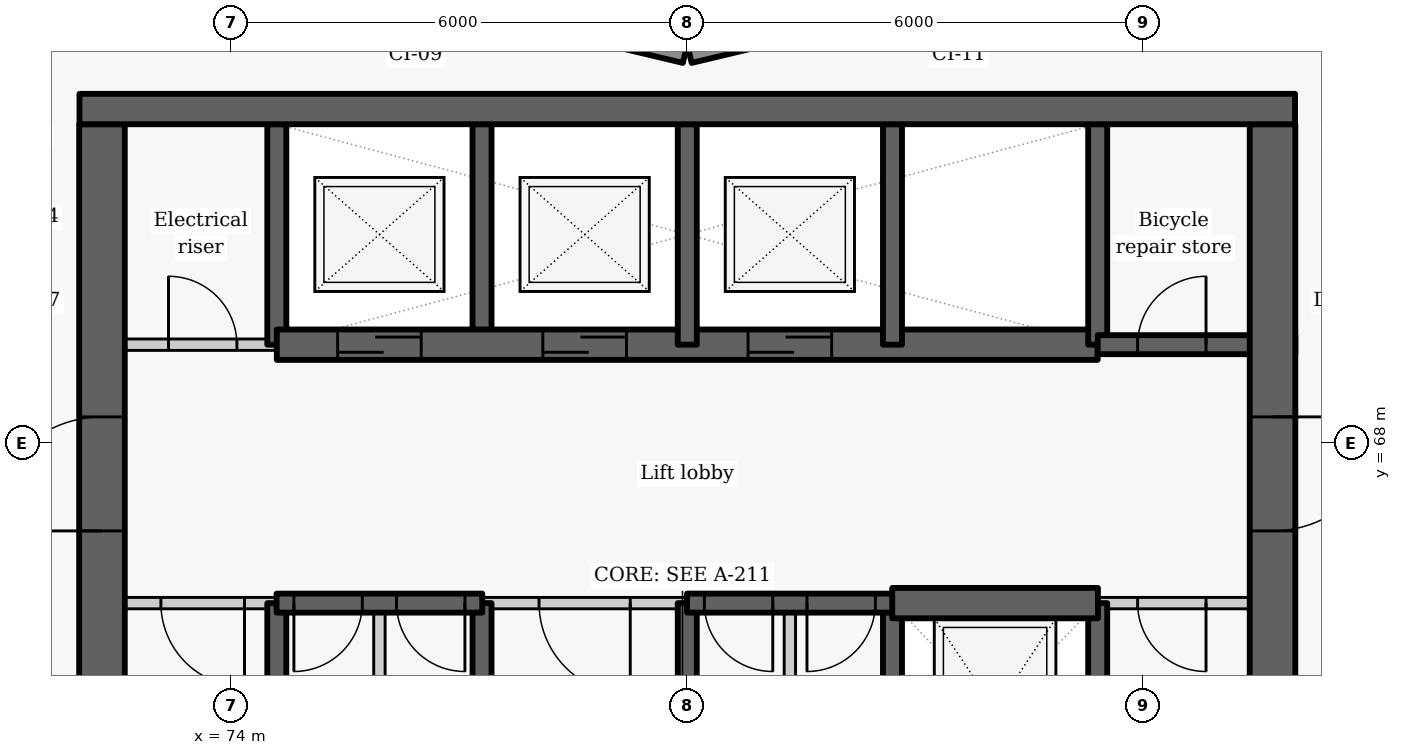
"""IFC4 building model, lengths in metres.
Left out: names, types, materials, properties, quantities, classifications, styles, units other than length and angle.
Written with IfcOpenShell. Run it as: python <this file> out.ifc"""

import sys

from ifc_helpers import new_model, si_unit, direction, frame, frame_2d, origin, place, context, subcontext, project, spatial, rectangle, extrude, element, fill, save


model = new_model("IFC4")
c1 = context("Model", 3, precision=1e-05, world=origin(), true_north=direction((0.0, 1.0)))
c2 = subcontext(c1, "Body", "Model", "MODEL_VIEW")
j1 = project(units=[si_unit("LENGTHUNIT", "METRE"), si_unit("PLANEANGLEUNIT", "RADIAN")], contexts=[c1])
p1 = place(None, origin())
s1 = spatial("IfcSite", under=j1, at=p1, CompositionType="ELEMENT")
p2 = place(p1, origin())
s2 = spatial("IfcBuilding", under=s1, at=p2, CompositionType="ELEMENT")
p3 = place(p2, frame((0.0, 0.0, 44.7)))
s3 = spatial("IfcBuildingStorey", under=s2, at=p3, CompositionType="ELEMENT", Elevation=44.7)
for number, where, z_axis, x_axis in (
    (1, (83.186, 73.881, 0.0), (0.0, 0.0, 1.0), (-0.973, -0.232, 0.0)),
    (2, (79.971, 73.128, 0.0), (0.0, 0.0, 1.0), (-0.973, 0.232, 0.0)),
):
    element("IfcWall", number, at=place(p3, frame(where, z_axis=z_axis, x_axis=x_axis)), inside=s3, PredefinedType="SOLIDWALL", context=c2, shape_type="SweptSolid", body=[
        extrude(rectangle(XDim=3.246, YDim=0.25, at=frame_2d((1.623, 0.0))), origin(), (0.0, 0.0, 1.0), 2.425),
    ])
p4 = place(p3, frame((74.6, 63.1, -0.275), z_axis=(0.0, 0.0, 1.0), x_axis=(0.0, 1.0, 0.0)))
e3 = element("IfcWall", 3, at=p4, inside=s3, PredefinedType="SHEAR", context=c2, shape_type="SweptSolid", body=[
    extrude(rectangle(XDim=2.8, YDim=0.25, at=frame_2d((1.4, 0.0))), origin(), (0.0, 0.0, 1.0), 3.3),
])
p5 = place(p3, frame((74.6, 69.3, -0.275), z_axis=(0.0, 0.0, 1.0), x_axis=(0.0, 1.0, 0.0)))
e4 = element("IfcWall", 4, at=p5, inside=s3, PredefinedType="SHEAR", context=c2, shape_type="SweptSolid", body=[
    extrude(rectangle(XDim=2.9, YDim=0.25, at=frame_2d((1.45, 0.0))), origin(), (0.0, 0.0, 1.0), 3.3),
])
p6 = place(p3, frame((72.0, 69.3, 0.0), z_axis=(0.0, 0.0, 1.0), x_axis=(1.0, 0.0, 0.0)))
e5 = element("IfcWall", 5, at=p6, inside=s3, PredefinedType="PARTITIONING", context=c2, shape_type="SweptSolid", body=[
    extrude(rectangle(XDim=2.6, YDim=0.15, at=frame_2d((1.3, 0.0))), origin(), (0.0, 0.0, 1.0), 3.025),
])
p7 = place(p6, frame((1.175, 0.0, 0.0)))
e6 = element("IfcOpeningElement", 6, at=p7, cuts=e5, PredefinedType="OPENING", context=c2, shape_type="SweptSolid", body=[
    extrude(rectangle(XDim=0.9, YDim=2.1, at=frame_2d((0.45, 1.05))), frame((0.0, 0.085, 0.0), z_axis=(0.0, -1.0, 0.0), x_axis=(1.0, 0.0, 0.0)), (0.0, 0.0, 1.0), 0.17),
])
p8 = place(p3, frame((72.3, 63.1, -0.275), z_axis=(0.0, 0.0, 1.0), x_axis=(0.0, 1.0, 0.0)))
e7 = element("IfcWall", 7, at=p8, inside=s3, PredefinedType="SHEAR", context=c2, shape_type="SweptSolid", body=[
    extrude(rectangle(XDim=9.1, YDim=0.6, at=frame_2d((4.55, 0.0))), origin(), (0.0, 0.0, 1.0), 3.3),
])
p9 = place(p8, frame((3.75, 0.0, 0.275)))
e8 = element("IfcOpeningElement", 8, at=p9, cuts=e7, PredefinedType="OPENING", context=c2, shape_type="SweptSolid", body=[
    extrude(rectangle(XDim=1.5, YDim=2.1, at=frame_2d((0.75, 1.05))), frame((0.0, 0.31, 0.0), z_axis=(0.0, -1.0, 0.0), x_axis=(1.0, 0.0, 0.0)), (0.0, 0.0, 1.0), 0.62),
])
p10 = place(p3, frame((77.3, 63.1, -0.275), z_axis=(0.0, 0.0, 1.0), x_axis=(0.0, 1.0, 0.0)))
e9 = element("IfcWall", 9, at=p10, inside=s3, PredefinedType="SHEAR", context=c2, shape_type="SweptSolid", body=[
    extrude(rectangle(XDim=2.8, YDim=0.25, at=frame_2d((1.4, 0.0))), origin(), (0.0, 0.0, 1.0), 3.3),
])
p11 = place(p3, frame((77.3, 69.3, -0.275), z_axis=(0.0, 0.0, 1.0), x_axis=(0.0, 1.0, 0.0)))
e10 = element("IfcWall", 10, at=p11, inside=s3, PredefinedType="SHEAR", context=c2, shape_type="SweptSolid", body=[
    extrude(rectangle(XDim=2.9, YDim=0.25, at=frame_2d((1.45, 0.0))), origin(), (0.0, 0.0, 1.0), 3.3),
])
p12 = place(p3, frame((74.6, 69.3, -0.275), z_axis=(0.0, 0.0, 1.0), x_axis=(1.0, 0.0, 0.0)))
e11 = element("IfcWall", 11, at=p12, inside=s3, PredefinedType="SHEAR", context=c2, shape_type="SweptSolid", body=[
    extrude(rectangle(XDim=10.8, YDim=0.4, at=frame_2d((5.4, 0.0))), origin(), (0.0, 0.0, 1.0), 3.3),
])
p13 = place(p12, frame((0.8, 0.0, 0.275)))
e12 = element("IfcOpeningElement", 12, at=p13, cuts=e11, PredefinedType="OPENING", context=c2, shape_type="SweptSolid", body=[
    extrude(rectangle(XDim=1.1, YDim=2.1, at=frame_2d((0.55, 1.05))), frame((0.0, 0.21, 0.0), z_axis=(0.0, -1.0, 0.0), x_axis=(1.0, 0.0, 0.0)), (0.0, 0.0, 1.0), 0.42),
])
p14 = place(p12, frame((3.5, 0.0, 0.275)))
e13 = element("IfcOpeningElement", 13, at=p14, cuts=e11, PredefinedType="OPENING", context=c2, shape_type="SweptSolid", body=[
    extrude(rectangle(XDim=1.1, YDim=2.1, at=frame_2d((0.55, 1.05))), frame((0.0, 0.21, 0.0), z_axis=(0.0, -1.0, 0.0), x_axis=(1.0, 0.0, 0.0)), (0.0, 0.0, 1.0), 0.42),
])
p15 = place(p12, frame((6.2, 0.0, 0.275)))
e14 = element("IfcOpeningElement", 14, at=p15, cuts=e11, PredefinedType="OPENING", context=c2, shape_type="SweptSolid", body=[
    extrude(rectangle(XDim=1.1, YDim=2.1, at=frame_2d((0.55, 1.05))), frame((0.0, 0.21, 0.0), z_axis=(0.0, -1.0, 0.0), x_axis=(1.0, 0.0, 0.0)), (0.0, 0.0, 1.0), 0.42),
])
p16 = place(p3, frame((80.0, 63.1, -0.275), z_axis=(0.0, 0.0, 1.0), x_axis=(0.0, 1.0, 0.0)))
e15 = element("IfcWall", 15, at=p16, inside=s3, PredefinedType="SHEAR", context=c2, shape_type="SweptSolid", body=[
    extrude(rectangle(XDim=2.8, YDim=0.25, at=frame_2d((1.4, 0.0))), origin(), (0.0, 0.0, 1.0), 3.3),
])
p17 = place(p3, frame((80.0, 69.3, -0.275), z_axis=(0.0, 0.0, 1.0), x_axis=(0.0, 1.0, 0.0)))
e16 = element("IfcWall", 16, at=p17, inside=s3, PredefinedType="SHEAR", context=c2, shape_type="SweptSolid", body=[
    extrude(rectangle(XDim=2.9, YDim=0.25, at=frame_2d((1.45, 0.0))), origin(), (0.0, 0.0, 1.0), 3.3),
])
p18 = place(p3, frame((82.7, 63.1, -0.275), z_axis=(0.0, 0.0, 1.0), x_axis=(0.0, 1.0, 0.0)))
e17 = element("IfcWall", 17, at=p18, inside=s3, PredefinedType="SHEAR", context=c2, shape_type="SweptSolid", body=[
    extrude(rectangle(XDim=2.8, YDim=0.25, at=frame_2d((1.4, 0.0))), origin(), (0.0, 0.0, 1.0), 3.3),
])
p19 = place(p3, frame((82.7, 69.3, -0.275), z_axis=(0.0, 0.0, 1.0), x_axis=(0.0, 1.0, 0.0)))
e18 = element("IfcWall", 18, at=p19, inside=s3, PredefinedType="SHEAR", context=c2, shape_type="SweptSolid", body=[
    extrude(rectangle(XDim=2.9, YDim=0.25, at=frame_2d((1.45, 0.0))), origin(), (0.0, 0.0, 1.0), 3.3),
])
p20 = place(p3, frame((85.4, 63.1, -0.275), z_axis=(0.0, 0.0, 1.0), x_axis=(0.0, 1.0, 0.0)))
e19 = element("IfcWall", 19, at=p20, inside=s3, PredefinedType="SHEAR", context=c2, shape_type="SweptSolid", body=[
    extrude(rectangle(XDim=2.8, YDim=0.25, at=frame_2d((1.4, 0.0))), origin(), (0.0, 0.0, 1.0), 3.3),
])
p21 = place(p3, frame((85.4, 69.3, -0.275), z_axis=(0.0, 0.0, 1.0), x_axis=(0.0, 1.0, 0.0)))
e20 = element("IfcWall", 20, at=p21, inside=s3, PredefinedType="SHEAR", context=c2, shape_type="SweptSolid", body=[
    extrude(rectangle(XDim=2.9, YDim=0.25, at=frame_2d((1.45, 0.0))), origin(), (0.0, 0.0, 1.0), 3.3),
])
p22 = place(p3, frame((85.4, 69.3, -0.275), z_axis=(0.0, 0.0, 1.0), x_axis=(1.0, 0.0, 0.0)))
e21 = element("IfcWall", 21, at=p22, inside=s3, PredefinedType="SHEAR", context=c2, shape_type="SweptSolid", body=[
    extrude(rectangle(XDim=2.6, YDim=0.25, at=frame_2d((1.3, 0.0))), origin(), (0.0, 0.0, 1.0), 3.3),
])
p23 = place(p22, frame((0.525, 0.0, 0.275)))
e22 = element("IfcOpeningElement", 22, at=p23, cuts=e21, PredefinedType="OPENING", context=c2, shape_type="SweptSolid", body=[
    extrude(rectangle(XDim=0.9, YDim=2.1, at=frame_2d((0.45, 1.05))), frame((0.0, 0.135, 0.0), z_axis=(0.0, -1.0, 0.0), x_axis=(1.0, 0.0, 0.0)), (0.0, 0.0, 1.0), 0.27),
])
p24 = place(p3, frame((87.7, 72.2, -0.275), z_axis=(0.0, 0.0, 1.0), x_axis=(0.0, -1.0, 0.0)))
e23 = element("IfcWall", 23, at=p24, inside=s3, PredefinedType="SHEAR", context=c2, shape_type="SweptSolid", body=[
    extrude(rectangle(XDim=15.6, YDim=0.6, at=frame_2d((7.8, 0.0))), origin(), (0.0, 0.0, 1.0), 3.3),
])
p25 = place(p24, frame((3.85, 0.0, 0.275)))
e24 = element("IfcOpeningElement", 24, at=p25, cuts=e23, PredefinedType="OPENING", context=c2, shape_type="SweptSolid", body=[
    extrude(rectangle(XDim=1.5, YDim=2.1, at=frame_2d((0.75, 1.05))), frame((0.0, 0.31, 0.0), z_axis=(0.0, -1.0, 0.0), x_axis=(1.0, 0.0, 0.0)), (0.0, 0.0, 1.0), 0.62),
])
p26 = place(p24, frame((11.8, 0.0, 0.275)))
e25 = element("IfcOpeningElement", 25, at=p26, cuts=e23, PredefinedType="OPENING", context=c2, shape_type="SweptSolid", body=[
    extrude(rectangle(XDim=1.1, YDim=2.1, at=frame_2d((0.55, 1.05))), frame((0.0, 0.31, 0.0), z_axis=(0.0, -1.0, 0.0), x_axis=(1.0, 0.0, 0.0)), (0.0, 0.0, 1.0), 0.62),
])
p27 = place(p3, frame((74.603, 65.9, 0.0), z_axis=(0.0, 0.0, 1.0), x_axis=(-1.0, 0.0, 0.0)))
e26 = element("IfcWall", 26, at=p27, inside=s3, PredefinedType="PARTITIONING", context=c2, shape_type="SweptSolid", body=[
    extrude(rectangle(XDim=2.603, YDim=0.15, at=frame_2d((1.302, 0.0))), origin(), (0.0, 0.0, 1.0), 3.025),
])
p28 = place(p27, frame((0.428, 0.0, 0.0)))
e27 = element("IfcOpeningElement", 27, at=p28, cuts=e26, PredefinedType="OPENING", context=c2, shape_type="SweptSolid", body=[
    extrude(rectangle(XDim=1.1, YDim=2.1, at=frame_2d((0.55, 1.05))), frame((0.0, 0.085, 0.0), z_axis=(0.0, -1.0, 0.0), x_axis=(1.0, 0.0, 0.0)), (0.0, 0.0, 1.0), 0.17),
])
p29 = place(p3, frame((80.003, 65.9, 0.0), z_axis=(0.0, 0.0, 1.0), x_axis=(-1.0, 0.0, 0.0)))
e28 = element("IfcWall", 28, at=p29, inside=s3, PredefinedType="PARTITIONING", context=c2, shape_type="SweptSolid", body=[
    extrude(rectangle(XDim=2.706, YDim=0.15, at=frame_2d((1.353, 0.0))), origin(), (0.0, 0.0, 1.0), 3.025),
])
p30 = place(p29, frame((0.753, 0.0, 0.0)))
e29 = element("IfcOpeningElement", 29, at=p30, cuts=e28, PredefinedType="OPENING", context=c2, shape_type="SweptSolid", body=[
    extrude(rectangle(XDim=1.2, YDim=2.1, at=frame_2d((0.6, 1.05))), frame((0.0, 0.085, 0.0), z_axis=(0.0, -1.0, 0.0), x_axis=(1.0, 0.0, 0.0)), (0.0, 0.0, 1.0), 0.17),
])
p31 = place(p3, frame((88.0, 65.9, 0.0), z_axis=(0.0, 0.0, 1.0), x_axis=(-1.0, 0.0, 0.0)))
e30 = element("IfcWall", 30, at=p31, inside=s3, PredefinedType="PARTITIONING", context=c2, shape_type="SweptSolid", body=[
    extrude(rectangle(XDim=2.603, YDim=0.15, at=frame_2d((1.302, 0.0))), origin(), (0.0, 0.0, 1.0), 3.025),
])
p32 = place(p31, frame((1.175, 0.0, 0.0)))
e31 = element("IfcOpeningElement", 31, at=p32, cuts=e30, PredefinedType="OPENING", context=c2, shape_type="SweptSolid", body=[
    extrude(rectangle(XDim=0.9, YDim=2.1, at=frame_2d((0.45, 1.05))), frame((0.0, 0.085, 0.0), z_axis=(0.0, -1.0, 0.0), x_axis=(1.0, 0.0, 0.0)), (0.0, 0.0, 1.0), 0.17),
])
p33 = place(p3, frame((77.303, 65.9, -0.275), z_axis=(0.0, 0.0, 1.0), x_axis=(-1.0, 0.0, 0.0)))
e32 = element("IfcWall", 32, at=p33, inside=s3, PredefinedType="SHEAR", context=c2, shape_type="SweptSolid", body=[
    extrude(rectangle(XDim=2.706, YDim=0.25, at=frame_2d((1.353, 0.0))), origin(), (0.0, 0.0, 1.0), 3.3),
])
p34 = place(p33, frame((1.578, 0.0, 0.275)))
e33 = element("IfcOpeningElement", 33, at=p34, cuts=e32, PredefinedType="OPENING", context=c2, shape_type="SweptSolid", body=[
    extrude(rectangle(XDim=0.9, YDim=2.1, at=frame_2d((0.45, 1.05))), frame((0.0, 0.135, 0.0), z_axis=(0.0, -1.0, 0.0), x_axis=(1.0, 0.0, 0.0)), (0.0, 0.0, 1.0), 0.27),
])
p35 = place(p33, frame((0.228, 0.0, 0.275)))
e34 = element("IfcOpeningElement", 34, at=p35, cuts=e32, PredefinedType="OPENING", context=c2, shape_type="SweptSolid", body=[
    extrude(rectangle(XDim=0.9, YDim=2.1, at=frame_2d((0.45, 1.05))), frame((0.0, 0.135, 0.0), z_axis=(0.0, -1.0, 0.0), x_axis=(1.0, 0.0, 0.0)), (0.0, 0.0, 1.0), 0.27),
])
p36 = place(p3, frame((82.703, 65.9, -0.275), z_axis=(0.0, 0.0, 1.0), x_axis=(-1.0, 0.0, 0.0)))
e35 = element("IfcWall", 35, at=p36, inside=s3, PredefinedType="SHEAR", context=c2, shape_type="SweptSolid", body=[
    extrude(rectangle(XDim=2.706, YDim=0.25, at=frame_2d((1.353, 0.0))), origin(), (0.0, 0.0, 1.0), 3.3),
])
p37 = place(p36, frame((1.578, 0.0, 0.275)))
e36 = element("IfcOpeningElement", 36, at=p37, cuts=e35, PredefinedType="OPENING", context=c2, shape_type="SweptSolid", body=[
    extrude(rectangle(XDim=0.9, YDim=2.1, at=frame_2d((0.45, 1.05))), frame((0.0, 0.135, 0.0), z_axis=(0.0, -1.0, 0.0), x_axis=(1.0, 0.0, 0.0)), (0.0, 0.0, 1.0), 0.27),
])
p38 = place(p36, frame((0.228, 0.0, 0.275)))
e37 = element("IfcOpeningElement", 37, at=p38, cuts=e35, PredefinedType="OPENING", context=c2, shape_type="SweptSolid", body=[
    extrude(rectangle(XDim=0.9, YDim=2.1, at=frame_2d((0.45, 1.05))), frame((0.0, 0.135, 0.0), z_axis=(0.0, -1.0, 0.0), x_axis=(1.0, 0.0, 0.0)), (0.0, 0.0, 1.0), 0.27),
])
p39 = place(p3, frame((82.697, 65.9, -0.275), z_axis=(0.0, 0.0, 1.0), x_axis=(1.0, 0.0, 0.0)))
e38 = element("IfcWall", 38, at=p39, inside=s3, PredefinedType="SHEAR", context=c2, shape_type="SweptSolid", body=[
    extrude(rectangle(XDim=2.706, YDim=0.4, at=frame_2d((1.353, 0.0))), origin(), (0.0, 0.0, 1.0), 3.3),
])
for number, where, z_axis, x_axis in (
    (39, (75.95, 63.1, 0.0), (0.0, 0.0, 1.0), (0.0, 1.0, 0.0)),
    (40, (81.35, 63.1, 0.0), (0.0, 0.0, 1.0), (0.0, 1.0, 0.0)),
):
    element("IfcWall", number, at=place(p3, frame(where, z_axis=z_axis, x_axis=x_axis)), inside=s3, PredefinedType="PARTITIONING", context=c2, shape_type="SweptSolid", body=[
        extrude(rectangle(XDim=2.8, YDim=0.15, at=frame_2d((1.4, 0.0))), origin(), (0.0, 0.0, 1.0), 3.025),
    ])
p40 = place(p3, frame((72.004, 72.4, -0.275), z_axis=(0.0, 0.0, 1.0), x_axis=(1.0, 0.0, 0.0)))
e41 = element("IfcWall", 41, at=p40, inside=s3, PredefinedType="SHEAR", context=c2, shape_type="SweptSolid", body=[
    extrude(rectangle(XDim=15.992, YDim=0.4, at=frame_2d((7.996, 0.0))), origin(), (0.0, 0.0, 1.0), 3.3),
])
p41 = place(p7, origin())
e42 = element("IfcDoor", 42, at=p41, inside=s3, OperationType="SINGLE_SWING_LEFT", PredefinedType="DOOR", context=c2, shape_type="SweptSolid", body=[
    extrude(rectangle(XDim=0.9, YDim=2.1, at=frame_2d((0.45, 1.05))), frame((0.0, 0.025, 0.0), z_axis=(0.0, -1.0, 0.0), x_axis=(1.0, 0.0, 0.0)), (0.0, 0.0, 1.0), 0.05),
])
fill(e6, e42)
p42 = place(p13, origin())
e43 = element("IfcDoor", 43, at=p42, inside=s3, OperationType="SLIDING_TO_LEFT", PredefinedType="DOOR", context=c2, shape_type="SweptSolid", body=[
    extrude(rectangle(XDim=1.1, YDim=2.1, at=frame_2d((0.55, 1.05))), frame((0.0, 0.025, 0.0), z_axis=(0.0, -1.0, 0.0), x_axis=(1.0, 0.0, 0.0)), (0.0, 0.0, 1.0), 0.05),
])
fill(e12, e43)
p43 = place(p14, origin())
e44 = element("IfcDoor", 44, at=p43, inside=s3, OperationType="SLIDING_TO_LEFT", PredefinedType="DOOR", context=c2, shape_type="SweptSolid", body=[
    extrude(rectangle(XDim=1.1, YDim=2.1, at=frame_2d((0.55, 1.05))), frame((0.0, 0.025, 0.0), z_axis=(0.0, -1.0, 0.0), x_axis=(1.0, 0.0, 0.0)), (0.0, 0.0, 1.0), 0.05),
])
fill(e13, e44)
p44 = place(p15, origin())
e45 = element("IfcDoor", 45, at=p44, inside=s3, OperationType="SLIDING_TO_LEFT", PredefinedType="DOOR", context=c2, shape_type="SweptSolid", body=[
    extrude(rectangle(XDim=1.1, YDim=2.1, at=frame_2d((0.55, 1.05))), frame((0.0, 0.025, 0.0), z_axis=(0.0, -1.0, 0.0), x_axis=(1.0, 0.0, 0.0)), (0.0, 0.0, 1.0), 0.05),
])
fill(e14, e45)
p45 = place(p23, origin())
e46 = element("IfcDoor", 46, at=p45, inside=s3, OperationType="SINGLE_SWING_RIGHT", PredefinedType="DOOR", context=c2, shape_type="SweptSolid", body=[
    extrude(rectangle(XDim=0.9, YDim=2.1, at=frame_2d((0.45, 1.05))), frame((0.0, 0.025, 0.0), z_axis=(0.0, -1.0, 0.0), x_axis=(1.0, 0.0, 0.0)), (0.0, 0.0, 1.0), 0.05),
])
fill(e22, e46)
p46 = place(p28, origin())
e47 = element("IfcDoor", 47, at=p46, inside=s3, OperationType="SINGLE_SWING_LEFT", PredefinedType="DOOR", context=c2, shape_type="SweptSolid", body=[
    extrude(rectangle(XDim=1.1, YDim=2.1, at=frame_2d((0.55, 1.05))), frame((0.0, 0.025, 0.0), z_axis=(0.0, -1.0, 0.0), x_axis=(1.0, 0.0, 0.0)), (0.0, 0.0, 1.0), 0.05),
])
fill(e27, e47)
p47 = place(p34, origin())
e48 = element("IfcDoor", 48, at=p47, inside=s3, OperationType="SINGLE_SWING_RIGHT", PredefinedType="DOOR", context=c2, shape_type="SweptSolid", body=[
    extrude(rectangle(XDim=0.9, YDim=2.1, at=frame_2d((0.45, 1.05))), frame((0.0, 0.025, 0.0), z_axis=(0.0, -1.0, 0.0), x_axis=(1.0, 0.0, 0.0)), (0.0, 0.0, 1.0), 0.05),
])
fill(e33, e48)
p48 = place(p35, origin())
e49 = element("IfcDoor", 49, at=p48, inside=s3, OperationType="SINGLE_SWING_LEFT", PredefinedType="DOOR", context=c2, shape_type="SweptSolid", body=[
    extrude(rectangle(XDim=0.9, YDim=2.1, at=frame_2d((0.45, 1.05))), frame((0.0, 0.025, 0.0), z_axis=(0.0, -1.0, 0.0), x_axis=(1.0, 0.0, 0.0)), (0.0, 0.0, 1.0), 0.05),
])
fill(e34, e49)
p49 = place(p30, origin())
e50 = element("IfcDoor", 50, at=p49, inside=s3, OperationType="DOUBLE_DOOR_SINGLE_SWING", PredefinedType="DOOR", context=c2, shape_type="SweptSolid", body=[
    extrude(rectangle(XDim=1.2, YDim=2.1, at=frame_2d((0.6, 1.05))), frame((0.0, 0.025, 0.0), z_axis=(0.0, -1.0, 0.0), x_axis=(1.0, 0.0, 0.0)), (0.0, 0.0, 1.0), 0.05),
])
fill(e29, e50)
p50 = place(p37, origin())
e51 = element("IfcDoor", 51, at=p50, inside=s3, OperationType="SINGLE_SWING_LEFT", PredefinedType="DOOR", context=c2, shape_type="SweptSolid", body=[
    extrude(rectangle(XDim=0.9, YDim=2.1, at=frame_2d((0.45, 1.05))), frame((0.0, 0.025, 0.0), z_axis=(0.0, -1.0, 0.0), x_axis=(1.0, 0.0, 0.0)), (0.0, 0.0, 1.0), 0.05),
])
fill(e36, e51)
p51 = place(p38, origin())
e52 = element("IfcDoor", 52, at=p51, inside=s3, OperationType="SINGLE_SWING_RIGHT", PredefinedType="DOOR", context=c2, shape_type="SweptSolid", body=[
    extrude(rectangle(XDim=0.9, YDim=2.1, at=frame_2d((0.45, 1.05))), frame((0.0, 0.025, 0.0), z_axis=(0.0, -1.0, 0.0), x_axis=(1.0, 0.0, 0.0)), (0.0, 0.0, 1.0), 0.05),
])
fill(e37, e52)
p52 = place(p32, origin())
e53 = element("IfcDoor", 53, at=p52, inside=s3, OperationType="SINGLE_SWING_LEFT", PredefinedType="DOOR", context=c2, shape_type="SweptSolid", body=[
    extrude(rectangle(XDim=0.9, YDim=2.1, at=frame_2d((0.45, 1.05))), frame((0.0, 0.025, 0.0), z_axis=(0.0, -1.0, 0.0), x_axis=(1.0, 0.0, 0.0)), (0.0, 0.0, 1.0), 0.05),
])
fill(e31, e53)
p53 = place(p25, origin())
e54 = element("IfcDoor", 54, at=p53, inside=s3, OperationType="DOUBLE_DOOR_SINGLE_SWING", PredefinedType="DOOR", context=c2, shape_type="SweptSolid", body=[
    extrude(rectangle(XDim=1.5, YDim=2.1, at=frame_2d((0.75, 1.05))), frame((0.0, 0.025, 0.0), z_axis=(0.0, -1.0, 0.0), x_axis=(1.0, 0.0, 0.0)), (0.0, 0.0, 1.0), 0.05),
])
fill(e24, e54)
p54 = place(p9, origin())
e55 = element("IfcDoor", 55, at=p54, inside=s3, OperationType="DOUBLE_DOOR_SINGLE_SWING", PredefinedType="DOOR", context=c2, shape_type="SweptSolid", body=[
    extrude(rectangle(XDim=1.5, YDim=2.1, at=frame_2d((0.75, 1.05))), frame((0.0, 0.025, 0.0), z_axis=(0.0, -1.0, 0.0), x_axis=(1.0, 0.0, 0.0)), (0.0, 0.0, 1.0), 0.05),
])
fill(e8, e55)
save(model, sys.argv[1])
